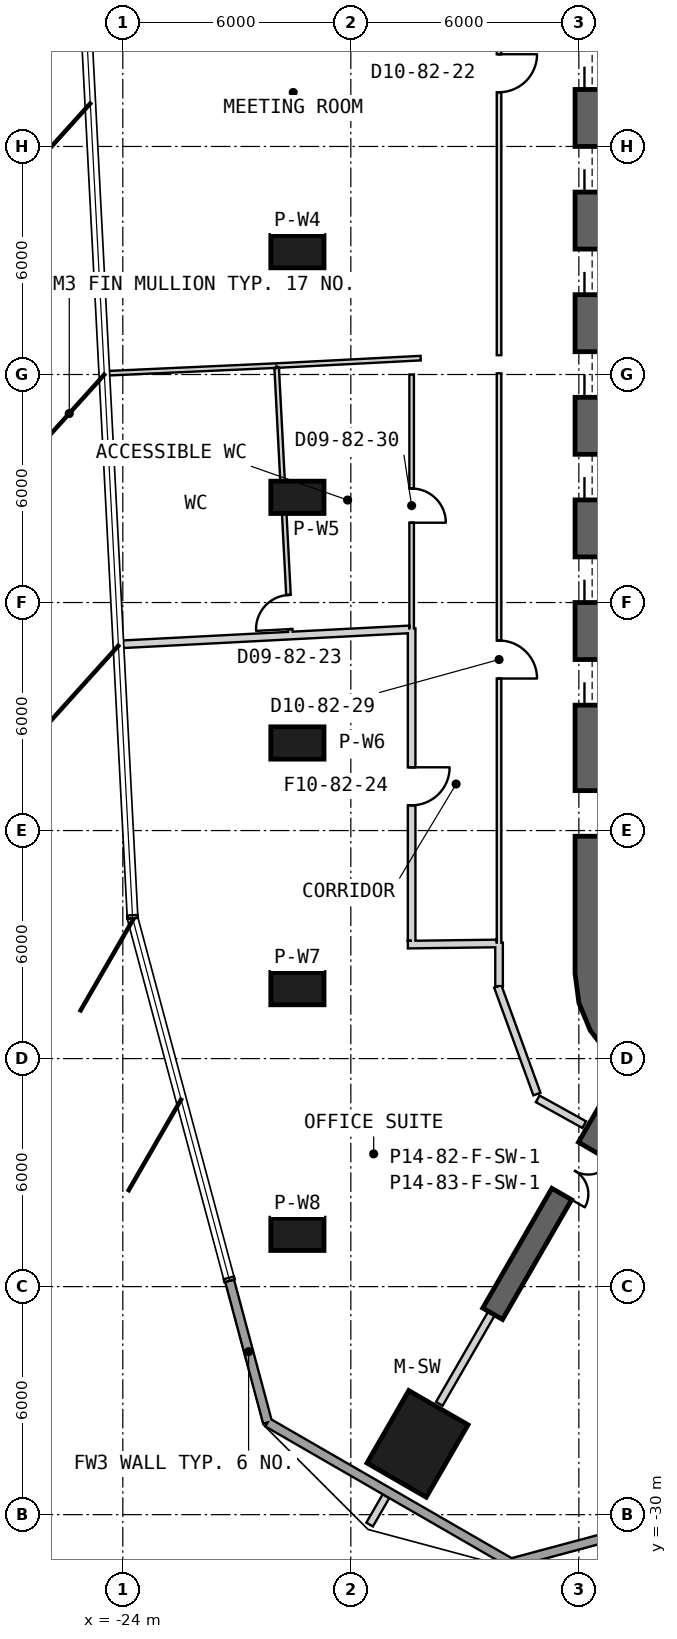
"""IFC4 building model, lengths in metres.
Left out: names, types, materials, properties, quantities, classifications, styles, units other than length and angle.
Written with IfcOpenShell. Run it as: python <this file> out.ifc"""

import sys

from ifc_helpers import new_model, si_unit, direction, frame, frame_2d, origin, origin_2d, place, context, subcontext, project, spatial, polyline, rectangle, outline, extrude, element, fill, save


model = new_model("IFC4")
c1 = context("Model", 3, precision=1e-05, world=origin(), true_north=direction((0.0, 1.0)))
c2 = subcontext(c1, "Body", "Model", "MODEL_VIEW")
j1 = project(units=[si_unit("LENGTHUNIT", "METRE"), si_unit("PLANEANGLEUNIT", "RADIAN")], contexts=[c1])
p1 = place(None, origin())
s1 = spatial("IfcSite", under=j1, at=p1, CompositionType="ELEMENT")
p2 = place(p1, origin())
s2 = spatial("IfcBuilding", under=s1, at=p2, CompositionType="ELEMENT")
p3 = place(p2, frame((0.0, 0.0, 357.2)))
s3 = spatial("IfcBuildingStorey", under=s2, at=p3, CompositionType="ELEMENT", Elevation=357.2)
p4 = place(p3, frame((-16.246, -28.138, 0.0), z_axis=(0.0, 0.0, 1.0), x_axis=(-0.5, -0.866025403784, 0.0)))
e1 = element("IfcColumn", 1, at=p4, inside=s3, PredefinedType="COLUMN", context=c2, shape_type="SweptSolid", body=[
    extrude(rectangle(XDim=2.2, YDim=1.8, at=origin_2d()), origin(), (0.0, 0.0, 1.0), 3.9),
])
for number, where, z_axis, x_axis in (
    (2, (-19.406, 3.232, 0.0), (0.0, 0.0, 1.0), (-1.0, 0.0, 0.0)),
    (3, (-19.406, -3.232, 0.0), (0.0, 0.0, 1.0), (-1.0, 0.0, 0.0)),
    (4, (-19.406, -9.696, 0.0), (0.0, 0.0, 1.0), (-1.0, 0.0, 0.0)),
    (5, (-19.406, -16.16, 0.0), (0.0, 0.0, 1.0), (-1.0, 0.0, 0.0)),
    (6, (-19.406, -22.624, 0.0), (0.0, 0.0, 1.0), (-1.0, 0.0, 0.0)),
):
    element("IfcColumn", number, at=place(p3, frame(where, z_axis=z_axis, x_axis=x_axis)), inside=s3, PredefinedType="COLUMN", context=c2, shape_type="SweptSolid", body=[
        extrude(rectangle(XDim=1.4, YDim=0.85, at=origin_2d()), origin(), (0.0, 0.0, 1.0), 3.9),
    ])
p5 = place(p3, frame((-11.65, 15.762, 0.0), z_axis=(0.0, 0.0, 1.0), x_axis=(0.0, -1.0, 0.0)))
e7 = element("IfcWall", 7, at=p5, inside=s3, PredefinedType="SHEAR", context=c2, shape_type="SweptSolid", body=[
    extrude(rectangle(XDim=31.523, YDim=0.9, at=frame_2d((15.762, 0.0))), origin(), (0.0, 0.0, 1.0), 3.9),
])
p6 = place(p5, frame((7.062, 0.0, 0.0)))
e8 = element("IfcOpeningElement", 8, at=p6, cuts=e7, PredefinedType="OPENING", context=c2, shape_type="SweptSolid", body=[
    extrude(rectangle(XDim=1.2, YDim=2.4, at=frame_2d((0.6, 1.2))), frame((0.0, 0.46, 0.0), z_axis=(0.0, -1.0, 0.0), x_axis=(1.0, 0.0, 0.0)), (0.0, 0.0, 1.0), 0.92),
])
p7 = place(p5, frame((9.762, 0.0, 0.0)))
e9 = element("IfcOpeningElement", 9, at=p7, cuts=e7, PredefinedType="OPENING", context=c2, shape_type="SweptSolid", body=[
    extrude(rectangle(XDim=1.2, YDim=2.4, at=frame_2d((0.6, 1.2))), frame((0.0, 0.46, 0.0), z_axis=(0.0, -1.0, 0.0), x_axis=(1.0, 0.0, 0.0)), (0.0, 0.0, 1.0), 0.92),
])
p8 = place(p5, frame((12.462, 0.0, 0.0)))
e10 = element("IfcOpeningElement", 10, at=p8, cuts=e7, PredefinedType="OPENING", context=c2, shape_type="SweptSolid", body=[
    extrude(rectangle(XDim=1.2, YDim=2.4, at=frame_2d((0.6, 1.2))), frame((0.0, 0.46, 0.0), z_axis=(0.0, -1.0, 0.0), x_axis=(1.0, 0.0, 0.0)), (0.0, 0.0, 1.0), 0.92),
])
p9 = place(p5, frame((15.162, 0.0, 0.0)))
e11 = element("IfcOpeningElement", 11, at=p9, cuts=e7, PredefinedType="OPENING", context=c2, shape_type="SweptSolid", body=[
    extrude(rectangle(XDim=1.2, YDim=2.4, at=frame_2d((0.6, 1.2))), frame((0.0, 0.46, 0.0), z_axis=(0.0, -1.0, 0.0), x_axis=(1.0, 0.0, 0.0)), (0.0, 0.0, 1.0), 0.92),
])
p10 = place(p5, frame((17.862, 0.0, 0.0)))
e12 = element("IfcOpeningElement", 12, at=p10, cuts=e7, PredefinedType="OPENING", context=c2, shape_type="SweptSolid", body=[
    extrude(rectangle(XDim=1.2, YDim=2.4, at=frame_2d((0.6, 1.2))), frame((0.0, 0.46, 0.0), z_axis=(0.0, -1.0, 0.0), x_axis=(1.0, 0.0, 0.0)), (0.0, 0.0, 1.0), 0.92),
])
p11 = place(p5, frame((20.562, 0.0, 0.0)))
e13 = element("IfcOpeningElement", 13, at=p11, cuts=e7, PredefinedType="OPENING", context=c2, shape_type="SweptSolid", body=[
    extrude(rectangle(XDim=1.2, YDim=2.4, at=frame_2d((0.6, 1.2))), frame((0.0, 0.46, 0.0), z_axis=(0.0, -1.0, 0.0), x_axis=(1.0, 0.0, 0.0)), (0.0, 0.0, 1.0), 0.92),
])
p12 = place(p5, frame((23.262, 0.0, 0.0)))
e14 = element("IfcOpeningElement", 14, at=p12, cuts=e7, PredefinedType="OPENING", context=c2, shape_type="SweptSolid", body=[
    extrude(rectangle(XDim=1.2, YDim=2.4, at=frame_2d((0.6, 1.2))), frame((0.0, 0.46, 0.0), z_axis=(0.0, -1.0, 0.0), x_axis=(1.0, 0.0, 0.0)), (0.0, 0.0, 1.0), 0.92),
])
p13 = place(p5, frame((3.612, 0.0, 0.0)))
e15 = element("IfcOpeningElement", 15, at=p13, cuts=e7, PredefinedType="OPENING", context=c2, shape_type="SweptSolid", body=[
    extrude(rectangle(XDim=1.2, YDim=2.4, at=frame_2d((0.6, 1.2))), frame((0.0, 0.46, 0.0), z_axis=(0.0, -1.0, 0.0), x_axis=(1.0, 0.0, 0.0)), (0.0, 0.0, 1.0), 0.92),
])
p14 = place(p5, frame((26.712, 0.0, 0.0)))
e16 = element("IfcOpeningElement", 16, at=p14, cuts=e7, PredefinedType="OPENING", context=c2, shape_type="SweptSolid", body=[
    extrude(rectangle(XDim=1.2, YDim=2.4, at=frame_2d((0.6, 1.2))), frame((0.0, 0.46, 0.0), z_axis=(0.0, -1.0, 0.0), x_axis=(1.0, 0.0, 0.0)), (0.0, 0.0, 1.0), 0.92),
])
p15 = place(p3, origin())
e17 = element("IfcWall", 17, at=p15, inside=s3, PredefinedType="SHEAR", context=c2, shape_type="SweptSolid", body=[
    extrude(outline(polyline([(-12.1, -15.762), (-11.998, -16.538), (-11.698, -17.262), (-11.221, -17.883), (-10.6, -18.36), (-9.876, -18.659), (-9.1, -18.762), (-8.323, -18.659), (-7.6, -18.36), (-8.05, -17.58), (-8.556, -17.79), (-9.1, -17.862), (-9.644, -17.79), (-10.15, -17.58), (-10.585, -17.247), (-10.919, -16.812), (-11.128, -16.305), (-11.2, -15.762), (-12.1, -15.762)])), origin(), (0.0, 0.0, 1.0), 3.9),
])
p16 = place(p3, frame((-10.575, -18.316, 0.0), z_axis=(0.0, 0.0, 1.0), x_axis=(-0.500009454961, -0.866019944892, 0.0)))
e18 = element("IfcWall", 18, at=p16, inside=s3, PredefinedType="SHEAR", context=c2, shape_type="SweptSolid", body=[
    extrude(rectangle(XDim=7.388, YDim=0.6, at=frame_2d((3.694, 0.0))), origin(), (0.0, 0.0, 1.0), 3.9),
])
p17 = place(p16, frame((1.4, 0.0, 0.0)))
e19 = element("IfcOpeningElement", 19, at=p17, cuts=e18, PredefinedType="OPENING", context=c2, shape_type="SweptSolid", body=[
    extrude(rectangle(XDim=1.4, YDim=2.4, at=frame_2d((0.7, 1.2))), frame((0.0, 0.31, 0.0), z_axis=(0.0, -1.0, 0.0), x_axis=(1.0, 0.0, 0.0)), (0.0, 0.0, 1.0), 0.62),
])
p18 = place(p3, frame((-21.19, -23.846, 0.0), z_axis=(0.0, 0.0, 1.0), x_axis=(0.258839344225, -0.965920386927, 0.0)))
e20 = element("IfcWall", 20, at=p18, inside=s3, PredefinedType="SOLIDWALL", context=c2, shape_type="SweptSolid", body=[
    extrude(rectangle(XDim=3.861, YDim=0.24, at=frame_2d((1.93, 0.0))), origin(), (0.0, 0.0, 1.0), 3.6),
])
p19 = place(p3, frame((-20.191, -27.575, 0.0), z_axis=(0.0, 0.0, 1.0), x_axis=(0.866022320763, -0.500005339912, 0.0)))
e21 = element("IfcWall", 21, at=p19, inside=s3, PredefinedType="SOLIDWALL", context=c2, shape_type="SweptSolid", body=[
    extrude(rectangle(XDim=7.396, YDim=0.24, at=frame_2d((3.698, 0.0))), origin(), (0.0, 0.0, 1.0), 3.6),
])
p20 = place(p3, frame((-13.786, -31.273, 0.0), z_axis=(0.0, 0.0, 1.0), x_axis=(0.965917910961, 0.258848583704, 0.0)))
e22 = element("IfcWall", 22, at=p20, inside=s3, PredefinedType="SOLIDWALL", context=c2, shape_type="SweptSolid", body=[
    extrude(rectangle(XDim=3.869, YDim=0.24, at=frame_2d((1.935, 0.0))), origin(), (0.0, 0.0, 1.0), 3.6),
])
p21 = place(p3, frame((-15.53, 0.0, 0.0), z_axis=(0.0, 0.0, 1.0), x_axis=(0.0, -1.0, 0.0)))
e23 = element("IfcWall", 23, at=p21, inside=s3, PredefinedType="PARTITIONING", context=c2, shape_type="SweptSolid", body=[
    extrude(rectangle(XDim=15.0, YDim=0.12, at=frame_2d((7.5, 0.0))), origin(), (0.0, 0.0, 1.0), 2.97),
])
p22 = place(p21, frame((7.0, 0.0, 0.0)))
e24 = element("IfcOpeningElement", 24, at=p22, cuts=e23, PredefinedType="OPENING", context=c2, shape_type="SweptSolid", body=[
    extrude(rectangle(XDim=1.0, YDim=2.1, at=frame_2d((0.5, 1.05))), frame((0.0, 0.07, 0.0), z_axis=(0.0, -1.0, 0.0), x_axis=(1.0, 0.0, 0.0)), (0.0, 0.0, 1.0), 0.14),
])
p23 = place(p3, frame((-17.9, -15.001, 0.0), z_axis=(0.0, 0.0, 1.0), x_axis=(0.999915662945, 0.012987185857, 0.0)))
e25 = element("IfcWall", 25, at=p23, inside=s3, PredefinedType="PARTITIONING", context=c2, shape_type="SweptSolid", body=[
    extrude(rectangle(XDim=2.5, YDim=0.2, at=frame_2d((1.25, 0.0))), origin(), (0.0, 0.0, 1.0), 2.97),
])
p24 = place(p3, frame((-17.8, 0.1, 0.0), z_axis=(0.0, 0.0, 1.0), x_axis=(0.0, -1.0, 0.0)))
e26 = element("IfcWall", 26, at=p24, inside=s3, PredefinedType="PARTITIONING", context=c2, shape_type="SweptSolid", body=[
    extrude(rectangle(XDim=6.954, YDim=0.2, at=frame_2d((3.477, 0.0))), origin(), (0.0, 0.0, 1.0), 3.07),
])
p25 = place(p24, frame((5.737, 0.0, 0.0)))
e27 = element("IfcOpeningElement", 27, at=p25, cuts=e26, PredefinedType="OPENING", context=c2, shape_type="SweptSolid", body=[
    extrude(rectangle(XDim=1.0, YDim=2.1, at=frame_2d((0.5, 1.05))), frame((0.0, 0.11, 0.0), z_axis=(0.0, -1.0, 0.0), x_axis=(1.0, 0.0, 0.0)), (0.0, 0.0, 1.0), 0.22),
])
p26 = place(p3, frame((-17.8, -6.854, 0.0), z_axis=(0.0, 0.0, 1.0), x_axis=(0.0, -1.0, 0.0)))
e28 = element("IfcWall", 28, at=p26, inside=s3, PredefinedType="PARTITIONING", context=c2, shape_type="SweptSolid", body=[
    extrude(rectangle(XDim=8.046, YDim=0.2, at=frame_2d((4.023, 0.0))), origin(), (0.0, 0.0, 1.0), 2.97),
])
p27 = place(p26, frame((5.6, 0.0, 0.0)))
e29 = element("IfcOpeningElement", 29, at=p27, cuts=e28, PredefinedType="OPENING", context=c2, shape_type="SweptSolid", body=[
    extrude(rectangle(XDim=1.0, YDim=2.1, at=frame_2d((0.5, 1.05))), frame((0.0, 0.11, 0.0), z_axis=(0.0, -1.0, 0.0), x_axis=(1.0, 0.0, 0.0)), (0.0, 0.0, 1.0), 0.22),
])
p28 = place(p3, frame((-15.4, -0.031, 0.0), z_axis=(0.0, 0.0, 1.0), x_axis=(-0.999914782125, 0.013054826261, 0.0)))
e30 = element("IfcWall", 30, at=p28, inside=s3, PredefinedType="PARTITIONING", context=c2, shape_type="SweptSolid", body=[
    extrude(rectangle(XDim=2.3, YDim=0.2, at=frame_2d((1.15, 0.0))), origin(), (0.0, 0.0, 1.0), 3.6),
])
p29 = place(p3, frame((-14.293, -19.978, 0.0), z_axis=(0.0, 0.0, 1.0), x_axis=(0.872510000486, -0.48859625362, 0.0)))
e31 = element("IfcWall", 31, at=p29, inside=s3, PredefinedType="PARTITIONING", context=c2, shape_type="SweptSolid", body=[
    extrude(rectangle(XDim=2.09, YDim=0.2, at=frame_2d((1.045, 0.0))), origin(), (0.0, 0.0, 1.0), 3.6),
])
p30 = place(p3, frame((-15.534, -16.346, 0.0), z_axis=(0.0, 0.0, 1.0), x_axis=(0.342001008711, -0.939699584996, 0.0)))
e32 = element("IfcWall", 32, at=p30, inside=s3, PredefinedType="PARTITIONING", context=c2, shape_type="SweptSolid", body=[
    extrude(rectangle(XDim=3.875, YDim=0.2, at=frame_2d((1.938, 0.0))), origin(), (0.0, 0.0, 1.0), 2.88),
])
p31 = place(p3, frame((-15.5, 16.541, 0.0), z_axis=(0.0, 0.0, 1.0), x_axis=(0.0, -1.0, 0.0)))
e33 = element("IfcWall", 33, at=p31, inside=s3, PredefinedType="PARTITIONING", context=c2, shape_type="SweptSolid", body=[
    extrude(rectangle(XDim=8.97, YDim=0.2, at=frame_2d((4.485, 0.0))), origin(), (0.0, 0.0, 1.0), 2.97),
])
p32 = place(p31, frame((4.026, 0.0, 0.0)))
e34 = element("IfcOpeningElement", 34, at=p32, cuts=e33, PredefinedType="OPENING", context=c2, shape_type="SweptSolid", body=[
    extrude(rectangle(XDim=1.0, YDim=2.1, at=frame_2d((0.5, 1.05))), frame((0.0, 0.11, 0.0), z_axis=(0.0, -1.0, 0.0), x_axis=(1.0, 0.0, 0.0)), (0.0, 0.0, 1.0), 0.22),
])
p33 = place(p3, frame((-15.5, 7.57, 0.0), z_axis=(0.0, 0.0, 1.0), x_axis=(0.0, -1.0, 0.0)))
e35 = element("IfcWall", 35, at=p33, inside=s3, PredefinedType="PARTITIONING", context=c2, shape_type="SweptSolid", body=[
    extrude(rectangle(XDim=7.5, YDim=0.2, at=frame_2d((3.75, 0.0))), origin(), (0.0, 0.0, 1.0), 3.07),
])
p34 = place(p3, frame((-15.5, -15.07, 0.0), z_axis=(0.0, 0.0, 1.0), x_axis=(0.0, -1.0, 0.0)))
e36 = element("IfcWall", 36, at=p34, inside=s3, PredefinedType="PARTITIONING", context=c2, shape_type="SweptSolid", body=[
    extrude(rectangle(XDim=1.271, YDim=0.2, at=frame_2d((0.635, 0.0))), origin(), (0.0, 0.0, 1.0), 3.6),
])
p35 = place(p3, frame((-12.05, -21.472, 0.0), z_axis=(0.0, 0.0, 1.0), x_axis=(0.859577966481, -0.511004617924, 0.0)))
e37 = element("IfcWall", 37, at=p35, inside=s3, PredefinedType="PARTITIONING", context=c2, shape_type="SweptSolid", body=[
    extrude(rectangle(XDim=1.998, YDim=0.2, at=frame_2d((0.999, 0.0))), origin(), (0.0, 0.0, 1.0), 3.6),
])
p36 = place(p3, frame((-17.9, -6.842, 0.0), z_axis=(0.0, 0.0, 1.0), x_axis=(-0.99865572064, -0.051833884993, 0.0)))
e38 = element("IfcWall", 38, at=p36, inside=s3, PredefinedType="PARTITIONING", context=c2, shape_type="SweptSolid", body=[
    extrude(rectangle(XDim=6.222, YDim=0.2, at=frame_2d((3.111, 0.0))), origin(), (0.0, 0.0, 1.0), 3.6),
])
p37 = place(p3, frame((-17.074, -29.513, 0.0), z_axis=(0.0, 0.0, 1.0), x_axis=(-0.500065409566, -0.86598763626, 0.0)))
e39 = element("IfcWall", 39, at=p37, inside=s3, PredefinedType="PARTITIONING", context=c2, shape_type="SweptSolid", body=[
    extrude(rectangle(XDim=0.863, YDim=0.2, at=frame_2d((0.431, 0.0))), origin(), (0.0, 0.0, 1.0), 3.6),
])
p38 = place(p3, frame((-14.284, -24.706, 0.0), z_axis=(0.0, 0.0, 1.0), x_axis=(-0.503849746753, -0.863791313164, 0.0)))
e40 = element("IfcWall", 40, at=p38, inside=s3, PredefinedType="PARTITIONING", context=c2, shape_type="SweptSolid", body=[
    extrude(rectangle(XDim=2.854, YDim=0.2, at=frame_2d((1.427, 0.0))), origin(), (0.0, 0.0, 1.0), 3.17),
])
p39 = place(p3, frame((-24.854, 7.102, 0.0), z_axis=(0.0, 0.0, 1.0), x_axis=(0.998654984193, 0.05184807178, 0.0)))
e41 = element("IfcWall", 41, at=p39, inside=s3, PredefinedType="PARTITIONING", context=c2, shape_type="SweptSolid", body=[
    extrude(rectangle(XDim=9.267, YDim=0.2, at=frame_2d((4.633, 0.0))), origin(), (0.0, 0.0, 1.0), 3.6),
])
p40 = place(p22, origin())
e42 = element("IfcDoor", 42, at=p40, inside=s3, OperationType="SINGLE_SWING_RIGHT", PredefinedType="NOTDEFINED", context=c2, shape_type="SweptSolid", body=[
    extrude(rectangle(XDim=1.0, YDim=2.1, at=frame_2d((0.5, 1.05))), frame((0.0, 0.025, 0.0), z_axis=(0.0, -1.0, 0.0), x_axis=(1.0, 0.0, 0.0)), (0.0, 0.0, 1.0), 0.05),
])
fill(e24, e42)
p41 = place(p27, origin())
e43 = element("IfcDoor", 43, at=p41, inside=s3, OperationType="SINGLE_SWING_RIGHT", PredefinedType="USERDEFINED", context=c2, shape_type="SweptSolid", body=[
    extrude(rectangle(XDim=1.0, YDim=2.1, at=frame_2d((0.5, 1.05))), frame((0.0, 0.025, 0.0), z_axis=(0.0, -1.0, 0.0), x_axis=(1.0, 0.0, 0.0)), (0.0, 0.0, 1.0), 0.05),
])
fill(e29, e43)
p42 = place(p25, origin())
e44 = element("IfcDoor", 44, at=p42, inside=s3, OperationType="SINGLE_SWING_RIGHT", PredefinedType="USERDEFINED", context=c2, shape_type="SweptSolid", body=[
    extrude(rectangle(XDim=1.0, YDim=2.1, at=frame_2d((0.5, 1.05))), frame((0.0, 0.025, 0.0), z_axis=(0.0, -1.0, 0.0), x_axis=(1.0, 0.0, 0.0)), (0.0, 0.0, 1.0), 0.05),
])
fill(e27, e44)
p43 = place(p6, origin())
e45 = element("IfcDoor", 45, at=p43, inside=s3, OperationType="SLIDING_TO_LEFT", PredefinedType="USERDEFINED", context=c2, shape_type="SweptSolid", body=[
    extrude(rectangle(XDim=1.2, YDim=2.4, at=frame_2d((0.6, 1.2))), frame((0.0, 0.025, 0.0), z_axis=(0.0, -1.0, 0.0), x_axis=(1.0, 0.0, 0.0)), (0.0, 0.0, 1.0), 0.05),
])
fill(e8, e45)
p44 = place(p7, origin())
e46 = element("IfcDoor", 46, at=p44, inside=s3, OperationType="SLIDING_TO_LEFT", PredefinedType="USERDEFINED", context=c2, shape_type="SweptSolid", body=[
    extrude(rectangle(XDim=1.2, YDim=2.4, at=frame_2d((0.6, 1.2))), frame((0.0, 0.025, 0.0), z_axis=(0.0, -1.0, 0.0), x_axis=(1.0, 0.0, 0.0)), (0.0, 0.0, 1.0), 0.05),
])
fill(e9, e46)
p45 = place(p8, origin())
e47 = element("IfcDoor", 47, at=p45, inside=s3, OperationType="SLIDING_TO_LEFT", PredefinedType="USERDEFINED", context=c2, shape_type="SweptSolid", body=[
    extrude(rectangle(XDim=1.2, YDim=2.4, at=frame_2d((0.6, 1.2))), frame((0.0, 0.025, 0.0), z_axis=(0.0, -1.0, 0.0), x_axis=(1.0, 0.0, 0.0)), (0.0, 0.0, 1.0), 0.05),
])
fill(e10, e47)
p46 = place(p9, origin())
e48 = element("IfcDoor", 48, at=p46, inside=s3, OperationType="SLIDING_TO_LEFT", PredefinedType="USERDEFINED", context=c2, shape_type="SweptSolid", body=[
    extrude(rectangle(XDim=1.2, YDim=2.4, at=frame_2d((0.6, 1.2))), frame((0.0, 0.025, 0.0), z_axis=(0.0, -1.0, 0.0), x_axis=(1.0, 0.0, 0.0)), (0.0, 0.0, 1.0), 0.05),
])
fill(e11, e48)
p47 = place(p10, origin())
e49 = element("IfcDoor", 49, at=p47, inside=s3, OperationType="SLIDING_TO_LEFT", PredefinedType="USERDEFINED", context=c2, shape_type="SweptSolid", body=[
    extrude(rectangle(XDim=1.2, YDim=2.4, at=frame_2d((0.6, 1.2))), frame((0.0, 0.025, 0.0), z_axis=(0.0, -1.0, 0.0), x_axis=(1.0, 0.0, 0.0)), (0.0, 0.0, 1.0), 0.05),
])
fill(e12, e49)
p48 = place(p11, origin())
e50 = element("IfcDoor", 50, at=p48, inside=s3, OperationType="SLIDING_TO_LEFT", PredefinedType="USERDEFINED", context=c2, shape_type="SweptSolid", body=[
    extrude(rectangle(XDim=1.2, YDim=2.4, at=frame_2d((0.6, 1.2))), frame((0.0, 0.025, 0.0), z_axis=(0.0, -1.0, 0.0), x_axis=(1.0, 0.0, 0.0)), (0.0, 0.0, 1.0), 0.05),
])
fill(e13, e50)
p49 = place(p12, origin())
e51 = element("IfcDoor", 51, at=p49, inside=s3, OperationType="SLIDING_TO_LEFT", PredefinedType="USERDEFINED", context=c2, shape_type="SweptSolid", body=[
    extrude(rectangle(XDim=1.2, YDim=2.4, at=frame_2d((0.6, 1.2))), frame((0.0, 0.025, 0.0), z_axis=(0.0, -1.0, 0.0), x_axis=(1.0, 0.0, 0.0)), (0.0, 0.0, 1.0), 0.05),
])
fill(e14, e51)
p50 = place(p14, origin())
e52 = element("IfcDoor", 52, at=p50, inside=s3, OperationType="SINGLE_SWING_LEFT", PredefinedType="USERDEFINED", context=c2, shape_type="SweptSolid", body=[
    extrude(rectangle(XDim=1.2, YDim=2.4, at=frame_2d((0.6, 1.2))), frame((0.0, 0.025, 0.0), z_axis=(0.0, -1.0, 0.0), x_axis=(1.0, 0.0, 0.0)), (0.0, 0.0, 1.0), 0.05),
])
fill(e16, e52)
p51 = place(p17, origin())
e53 = element("IfcDoor", 53, at=p51, inside=s3, OperationType="DOUBLE_DOOR_SINGLE_SWING", PredefinedType="NOTDEFINED", context=c2, shape_type="SweptSolid", body=[
    extrude(rectangle(XDim=1.4, YDim=2.4, at=frame_2d((0.7, 1.2))), frame((0.0, 0.025, 0.0), z_axis=(0.0, -1.0, 0.0), x_axis=(1.0, 0.0, 0.0)), (0.0, 0.0, 1.0), 0.05),
])
fill(e19, e53)
save(model, sys.argv[1])
